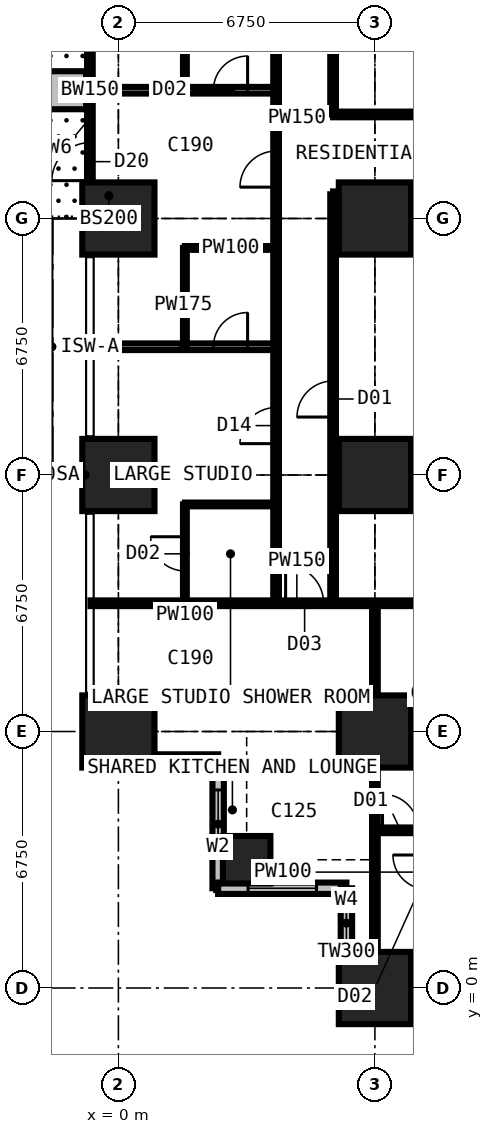
"""IFC4 building model, lengths in metres.
Left out: names, types, materials, properties, quantities, classifications, styles, units other than length and angle.
Written with IfcOpenShell. Run it as: python <this file> out.ifc"""

import sys

from ifc_helpers import new_model, si_unit, direction, frame, frame_2d, origin, origin_2d, place, context, subcontext, project, spatial, rectangle, extrude, element, fill, save


model = new_model("IFC4")
c1 = context("Model", 3, precision=1e-05, world=origin(), true_north=direction((0.0, 1.0)))
c2 = subcontext(c1, "Body", "Model", "MODEL_VIEW")
j1 = project(units=[si_unit("LENGTHUNIT", "METRE"), si_unit("PLANEANGLEUNIT", "RADIAN")], contexts=[c1])
p1 = place(None, origin())
s1 = spatial("IfcSite", under=j1, at=p1, CompositionType="ELEMENT")
p2 = place(p1, origin())
s2 = spatial("IfcBuilding", under=s1, at=p2, CompositionType="ELEMENT")
p3 = place(p2, frame((0.0, 0.0, 28.8)))
s3 = spatial("IfcBuildingStorey", under=s2, at=p3, CompositionType="ELEMENT", Elevation=28.8)
for number, where, z_axis, x_axis in (
    (1, (0.0, 6.75, 0.0), (0.0, 0.0, 1.0), (1.0, 0.0, 0.0)),
    (2, (0.0, 13.5, 0.0), (0.0, 0.0, 1.0), (1.0, 0.0, 0.0)),
    (3, (0.0, 20.25, 0.0), (0.0, 0.0, 1.0), (1.0, 0.0, 0.0)),
):
    element("IfcColumn", number, at=place(p3, frame(where, z_axis=z_axis, x_axis=x_axis)), inside=s3, PredefinedType="COLUMN", context=c2, shape_type="SweptSolid", body=[
        extrude(rectangle(XDim=1.9, YDim=1.9, at=origin_2d()), origin(), (0.0, 0.0, 1.0), 3.6),
    ])
p4 = place(p3, frame((3.375, 3.375, 0.0), z_axis=(0.0, 0.0, 1.0), x_axis=(1.0, 0.0, 0.0)))
e4 = element("IfcColumn", 4, at=p4, inside=s3, PredefinedType="COLUMN", context=c2, shape_type="SweptSolid", body=[
    extrude(rectangle(XDim=1.25, YDim=1.25, at=origin_2d()), origin(), (0.0, 0.0, 1.0), 3.6),
])
for number, where, z_axis, x_axis in (
    (5, (6.75, 0.0, 0.0), (0.0, 0.0, 1.0), (1.0, 0.0, 0.0)),
    (6, (6.75, 6.75, 0.0), (0.0, 0.0, 1.0), (1.0, 0.0, 0.0)),
    (7, (6.75, 13.5, 0.0), (0.0, 0.0, 1.0), (1.0, 0.0, 0.0)),
    (8, (6.75, 20.25, 0.0), (0.0, 0.0, 1.0), (1.0, 0.0, 0.0)),
):
    element("IfcColumn", number, at=place(p3, frame(where, z_axis=z_axis, x_axis=x_axis)), inside=s3, PredefinedType="COLUMN", context=c2, shape_type="SweptSolid", body=[
        extrude(rectangle(XDim=1.9, YDim=1.9, at=origin_2d()), origin(), (0.0, 0.0, 1.0), 3.6),
    ])
p5 = place(p3, frame((-0.75, 20.25, 0.0), z_axis=(0.0, 0.0, 1.0), x_axis=(0.0, 1.0, 0.0)))
e9 = element("IfcWall", 9, at=p5, inside=s3, PredefinedType="SOLIDWALL", context=c2, shape_type="SweptSolid", body=[
    extrude(rectangle(XDim=6.75, YDim=0.15, at=frame_2d((3.375, 0.0))), origin(), (0.0, 0.0, 1.0), 3.375),
])
p6 = place(p5, frame((0.996, 0.0, 0.0)))
e10 = element("IfcOpeningElement", 10, at=p6, cuts=e9, PredefinedType="OPENING", context=c2, shape_type="SweptSolid", body=[
    extrude(rectangle(XDim=1.0, YDim=2.2, at=frame_2d((0.5, 1.1))), frame((0.0, 0.085, 0.0), z_axis=(0.0, -1.0, 0.0), x_axis=(1.0, 0.0, 0.0)), (0.0, 0.0, 1.0), 0.17),
])
p7 = place(p5, frame((2.042, 0.0, 0.9)))
e11 = element("IfcOpeningElement", 11, at=p7, cuts=e9, PredefinedType="OPENING", context=c2, shape_type="SweptSolid", body=[
    extrude(rectangle(XDim=1.2, YDim=1.8, at=frame_2d((0.6, 0.9))), frame((0.0, 0.085, 0.0), z_axis=(0.0, -1.0, 0.0), x_axis=(1.0, 0.0, 0.0)), (0.0, 0.0, 1.0), 0.17),
])
p8 = place(p5, frame((4.754, 0.0, 0.0)))
e12 = element("IfcOpeningElement", 12, at=p8, cuts=e9, PredefinedType="OPENING", context=c2, shape_type="SweptSolid", body=[
    extrude(rectangle(XDim=1.0, YDim=2.2, at=frame_2d((0.5, 1.1))), frame((0.0, 0.085, 0.0), z_axis=(0.0, -1.0, 0.0), x_axis=(1.0, 0.0, 0.0)), (0.0, 0.0, 1.0), 0.17),
])
p9 = place(p5, frame((3.508, 0.0, 0.9)))
e13 = element("IfcOpeningElement", 13, at=p9, cuts=e9, PredefinedType="OPENING", context=c2, shape_type="SweptSolid", body=[
    extrude(rectangle(XDim=1.2, YDim=1.8, at=frame_2d((0.6, 0.9))), frame((0.0, 0.085, 0.0), z_axis=(0.0, -1.0, 0.0), x_axis=(1.0, 0.0, 0.0)), (0.0, 0.0, 1.0), 0.17),
])
p10 = place(p3, frame((-0.75, 6.0, 0.0), z_axis=(0.0, 0.0, 1.0), x_axis=(1.0, 0.0, 0.0)))
e14 = element("IfcWall", 14, at=p10, inside=s3, PredefinedType="SOLIDWALL", context=c2, shape_type="SweptSolid", body=[
    extrude(rectangle(XDim=3.375, YDim=0.3, at=frame_2d((1.688, 0.0))), origin(), (0.0, 0.0, 1.0), 3.375),
])
p11 = place(p10, frame((1.857, 0.0, 0.9)))
e15 = element("IfcOpeningElement", 15, at=p11, cuts=e14, PredefinedType="OPENING", context=c2, shape_type="SweptSolid", body=[
    extrude(rectangle(XDim=1.2, YDim=1.8, at=frame_2d((0.6, 0.9))), frame((0.0, 0.16, 0.0), z_axis=(0.0, -1.0, 0.0), x_axis=(1.0, 0.0, 0.0)), (0.0, 0.0, 1.0), 0.32),
])
p12 = place(p3, frame((2.625, 6.0, 0.0), z_axis=(0.0, 0.0, 1.0), x_axis=(0.0, -1.0, 0.0)))
e16 = element("IfcWall", 16, at=p12, inside=s3, PredefinedType="SOLIDWALL", context=c2, shape_type="SweptSolid", body=[
    extrude(rectangle(XDim=3.375, YDim=0.3, at=frame_2d((1.688, 0.0))), origin(), (0.0, 0.0, 1.0), 3.375),
])
p13 = place(p12, frame((0.788, 0.0, 0.6)))
e17 = element("IfcOpeningElement", 17, at=p13, cuts=e16, PredefinedType="OPENING", context=c2, shape_type="SweptSolid", body=[
    extrude(rectangle(XDim=1.8, YDim=2.1, at=frame_2d((0.9, 1.05))), frame((0.0, 0.16, 0.0), z_axis=(0.0, -1.0, 0.0), x_axis=(1.0, 0.0, 0.0)), (0.0, 0.0, 1.0), 0.32),
])
p14 = place(p3, frame((2.625, 2.625, 0.0), z_axis=(0.0, 0.0, 1.0), x_axis=(1.0, 0.0, 0.0)))
e18 = element("IfcWall", 18, at=p14, inside=s3, PredefinedType="SOLIDWALL", context=c2, shape_type="SweptSolid", body=[
    extrude(rectangle(XDim=3.375, YDim=0.3, at=frame_2d((1.688, 0.0))), origin(), (0.0, 0.0, 1.0), 3.375),
])
p15 = place(p14, frame((0.788, 0.0, 0.6)))
e19 = element("IfcOpeningElement", 19, at=p15, cuts=e18, PredefinedType="OPENING", context=c2, shape_type="SweptSolid", body=[
    extrude(rectangle(XDim=1.8, YDim=2.1, at=frame_2d((0.9, 1.05))), frame((0.0, 0.16, 0.0), z_axis=(0.0, -1.0, 0.0), x_axis=(1.0, 0.0, 0.0)), (0.0, 0.0, 1.0), 0.32),
])
p16 = place(p3, frame((6.0, 2.625, 0.0), z_axis=(0.0, 0.0, 1.0), x_axis=(0.0, -1.0, 0.0)))
e20 = element("IfcWall", 20, at=p16, inside=s3, PredefinedType="SOLIDWALL", context=c2, shape_type="SweptSolid", body=[
    extrude(rectangle(XDim=3.375, YDim=0.3, at=frame_2d((1.688, 0.0))), origin(), (0.0, 0.0, 1.0), 3.375),
])
p17 = place(p16, frame((0.317, 0.0, 0.9)))
e21 = element("IfcOpeningElement", 21, at=p17, cuts=e20, PredefinedType="OPENING", context=c2, shape_type="SweptSolid", body=[
    extrude(rectangle(XDim=1.2, YDim=1.8, at=frame_2d((0.6, 0.9))), frame((0.0, 0.16, 0.0), z_axis=(0.0, -1.0, 0.0), x_axis=(1.0, 0.0, 0.0)), (0.0, 0.0, 1.0), 0.32),
])
p18 = place(p3, frame((-0.85, 23.625, 0.0), z_axis=(0.0, 0.0, 1.0), x_axis=(-1.0, 0.0, 0.0)))
e22 = element("IfcWall", 22, at=p18, inside=s3, PredefinedType="USERDEFINED", context=c2, shape_type="SweptSolid", body=[
    extrude(rectangle(XDim=2.2, YDim=1.0, at=frame_2d((1.1, 0.0))), origin(), (0.0, 0.0, 1.0), 0.9),
])
p19 = place(p3, frame((-0.734, 10.125, 0.0), z_axis=(0.0, 0.0, 1.0), x_axis=(1.0, 0.0, 0.0)))
e23 = element("IfcWall", 23, at=p19, inside=s3, PredefinedType="PARTITIONING", context=c2, shape_type="SweptSolid", body=[
    extrude(rectangle(XDim=10.859, YDim=0.15, at=frame_2d((5.429, 0.0))), origin(), (0.0, 0.0, 1.0), 3.375),
])
p20 = place(p19, frame((5.134, 0.0, 0.0)))
e24 = element("IfcOpeningElement", 24, at=p20, cuts=e23, PredefinedType="OPENING", context=c2, shape_type="SweptSolid", body=[
    extrude(rectangle(XDim=1.0, YDim=2.2, at=frame_2d((0.5, 1.1))), frame((0.0, 0.085, 0.0), z_axis=(0.0, -1.0, 0.0), x_axis=(1.0, 0.0, 0.0)), (0.0, 0.0, 1.0), 0.17),
])
p21 = place(p3, frame((-0.734, 16.875, 0.0), z_axis=(0.0, 0.0, 1.0), x_axis=(1.0, 0.0, 0.0)))
e25 = element("IfcWall", 25, at=p21, inside=s3, PredefinedType="PARTITIONING", context=c2, shape_type="SweptSolid", body=[
    extrude(rectangle(XDim=4.884, YDim=0.175, at=frame_2d((2.442, 0.0))), origin(), (0.0, 0.0, 1.0), 3.375),
])
p22 = place(p21, frame((3.234, 0.0, 0.0)))
e26 = element("IfcOpeningElement", 26, at=p22, cuts=e25, PredefinedType="OPENING", context=c2, shape_type="SweptSolid", body=[
    extrude(rectangle(XDim=0.9, YDim=2.2, at=frame_2d((0.45, 1.1))), frame((0.0, 0.097, 0.0), z_axis=(0.0, -1.0, 0.0), x_axis=(1.0, 0.0, 0.0)), (0.0, 0.0, 1.0), 0.195),
])
p23 = place(p3, frame((-0.734, 23.625, 0.0), z_axis=(0.0, 0.0, 1.0), x_axis=(1.0, 0.0, 0.0)))
e27 = element("IfcWall", 27, at=p23, inside=s3, PredefinedType="PARTITIONING", context=c2, shape_type="SweptSolid", body=[
    extrude(rectangle(XDim=4.884, YDim=0.175, at=frame_2d((2.442, 0.0))), origin(), (0.0, 0.0, 1.0), 3.375),
])
p24 = place(p23, frame((3.234, 0.0, 0.0)))
e28 = element("IfcOpeningElement", 28, at=p24, cuts=e27, PredefinedType="OPENING", context=c2, shape_type="SweptSolid", body=[
    extrude(rectangle(XDim=0.9, YDim=2.2, at=frame_2d((0.45, 1.1))), frame((0.0, 0.097, 0.0), z_axis=(0.0, -1.0, 0.0), x_axis=(1.0, 0.0, 0.0)), (0.0, 0.0, 1.0), 0.195),
])
p25 = place(p3, frame((1.75, 10.125, 0.0), z_axis=(0.0, 0.0, 1.0), x_axis=(0.0, 1.0, 0.0)))
e29 = element("IfcWall", 29, at=p25, inside=s3, PredefinedType="PARTITIONING", context=c2, shape_type="SweptSolid", body=[
    extrude(rectangle(XDim=2.6, YDim=0.1, at=frame_2d((1.3, 0.0))), origin(), (0.0, 0.0, 1.0), 3.375),
])
p26 = place(p25, frame((0.85, 0.0, 0.0)))
e30 = element("IfcOpeningElement", 30, at=p26, cuts=e29, PredefinedType="OPENING", context=c2, shape_type="SweptSolid", body=[
    extrude(rectangle(XDim=0.9, YDim=2.2, at=frame_2d((0.45, 1.1))), frame((0.0, 0.06, 0.0), z_axis=(0.0, -1.0, 0.0), x_axis=(1.0, 0.0, 0.0)), (0.0, 0.0, 1.0), 0.12),
])
p27 = place(p3, frame((1.75, 12.725, 0.0), z_axis=(0.0, 0.0, 1.0), x_axis=(1.0, 0.0, 0.0)))
e31 = element("IfcWall", 31, at=p27, inside=s3, PredefinedType="PARTITIONING", context=c2, shape_type="SweptSolid", body=[
    extrude(rectangle(XDim=2.4, YDim=0.1, at=frame_2d((1.2, 0.0))), origin(), (0.0, 0.0, 1.0), 3.375),
])
p28 = place(p3, frame((1.75, 16.875, 0.0), z_axis=(0.0, 0.0, 1.0), x_axis=(0.0, 1.0, 0.0)))
e32 = element("IfcWall", 32, at=p28, inside=s3, PredefinedType="PARTITIONING", context=c2, shape_type="SweptSolid", body=[
    extrude(rectangle(XDim=2.6, YDim=0.1, at=frame_2d((1.3, 0.0))), origin(), (0.0, 0.0, 1.0), 3.375),
])
p29 = place(p3, frame((1.75, 19.475, 0.0), z_axis=(0.0, 0.0, 1.0), x_axis=(1.0, 0.0, 0.0)))
e33 = element("IfcWall", 33, at=p29, inside=s3, PredefinedType="PARTITIONING", context=c2, shape_type="SweptSolid", body=[
    extrude(rectangle(XDim=2.4, YDim=0.1, at=frame_2d((1.2, 0.0))), origin(), (0.0, 0.0, 1.0), 3.375),
])
p30 = place(p3, frame((1.75, 23.625, 0.0), z_axis=(0.0, 0.0, 1.0), x_axis=(0.0, 1.0, 0.0)))
e34 = element("IfcWall", 34, at=p30, inside=s3, PredefinedType="PARTITIONING", context=c2, shape_type="SweptSolid", body=[
    extrude(rectangle(XDim=2.6, YDim=0.1, at=frame_2d((1.3, 0.0))), origin(), (0.0, 0.0, 1.0), 3.375),
])
p31 = place(p3, frame((4.15, 10.125, 0.0), z_axis=(0.0, 0.0, 1.0), x_axis=(0.0, 1.0, 0.0)))
e35 = element("IfcWall", 35, at=p31, inside=s3, PredefinedType="PARTITIONING", context=c2, shape_type="SweptSolid", body=[
    extrude(rectangle(XDim=23.625, YDim=0.15, at=frame_2d((11.812, 0.0))), origin(), (0.0, 0.0, 1.0), 3.375),
])
p32 = place(p31, frame((4.2, 0.0, 0.0)))
e36 = element("IfcOpeningElement", 36, at=p32, cuts=e35, PredefinedType="OPENING", context=c2, shape_type="SweptSolid", body=[
    extrude(rectangle(XDim=0.95, YDim=2.2, at=frame_2d((0.475, 1.1))), frame((0.0, 0.085, 0.0), z_axis=(0.0, -1.0, 0.0), x_axis=(1.0, 0.0, 0.0)), (0.0, 0.0, 1.0), 0.17),
])
p33 = place(p31, frame((10.95, 0.0, 0.0)))
e37 = element("IfcOpeningElement", 37, at=p33, cuts=e35, PredefinedType="OPENING", context=c2, shape_type="SweptSolid", body=[
    extrude(rectangle(XDim=0.95, YDim=2.2, at=frame_2d((0.475, 1.1))), frame((0.0, 0.085, 0.0), z_axis=(0.0, -1.0, 0.0), x_axis=(1.0, 0.0, 0.0)), (0.0, 0.0, 1.0), 0.17),
])
p34 = place(p31, frame((17.7, 0.0, 0.0)))
e38 = element("IfcOpeningElement", 38, at=p34, cuts=e35, PredefinedType="OPENING", context=c2, shape_type="SweptSolid", body=[
    extrude(rectangle(XDim=0.95, YDim=2.2, at=frame_2d((0.475, 1.1))), frame((0.0, 0.085, 0.0), z_axis=(0.0, -1.0, 0.0), x_axis=(1.0, 0.0, 0.0)), (0.0, 0.0, 1.0), 0.17),
])
p35 = place(p3, frame((5.65, 10.125, 0.0), z_axis=(0.0, 0.0, 1.0), x_axis=(0.0, 1.0, 0.0)))
e39 = element("IfcWall", 39, at=p35, inside=s3, PredefinedType="PARTITIONING", context=c2, shape_type="SweptSolid", body=[
    extrude(rectangle(XDim=10.762, YDim=0.15, at=frame_2d((5.381, 0.0))), origin(), (0.0, 0.0, 1.0), 3.375),
])
p36 = place(p35, frame((4.9, 0.0, 0.0)))
e40 = element("IfcOpeningElement", 40, at=p36, cuts=e39, PredefinedType="OPENING", context=c2, shape_type="SweptSolid", body=[
    extrude(rectangle(XDim=0.95, YDim=2.2, at=frame_2d((0.475, 1.1))), frame((0.0, 0.085, 0.0), z_axis=(0.0, -1.0, 0.0), x_axis=(1.0, 0.0, 0.0)), (0.0, 0.0, 1.0), 0.17),
])
p37 = place(p3, frame((5.65, 20.887, 0.0), z_axis=(0.0, 0.0, 1.0), x_axis=(1.0, 0.0, 0.0)))
e41 = element("IfcWall", 41, at=p37, inside=s3, PredefinedType="PARTITIONING", context=c2, shape_type="SweptSolid", body=[
    extrude(rectangle(XDim=5.65, YDim=0.15, at=frame_2d((2.825, 0.0))), origin(), (0.0, 0.0, 1.0), 3.375),
])
p38 = place(p3, frame((5.65, 22.988, 0.0), z_axis=(0.0, 0.0, 1.0), x_axis=(0.0, 1.0, 0.0)))
e42 = element("IfcWall", 42, at=p38, inside=s3, PredefinedType="PARTITIONING", context=c2, shape_type="SweptSolid", body=[
    extrude(rectangle(XDim=10.762, YDim=0.15, at=frame_2d((5.381, 0.0))), origin(), (0.0, 0.0, 1.0), 3.375),
])
p39 = place(p38, frame((5.0, 0.0, 0.0)))
e43 = element("IfcOpeningElement", 43, at=p39, cuts=e42, PredefinedType="OPENING", context=c2, shape_type="SweptSolid", body=[
    extrude(rectangle(XDim=0.95, YDim=2.2, at=frame_2d((0.475, 1.1))), frame((0.0, 0.085, 0.0), z_axis=(0.0, -1.0, 0.0), x_axis=(1.0, 0.0, 0.0)), (0.0, 0.0, 1.0), 0.17),
])
p40 = place(p3, frame((5.65, 22.988, 0.0), z_axis=(0.0, 0.0, 1.0), x_axis=(1.0, 0.0, 0.0)))
e44 = element("IfcWall", 44, at=p40, inside=s3, PredefinedType="PARTITIONING", context=c2, shape_type="SweptSolid", body=[
    extrude(rectangle(XDim=5.65, YDim=0.15, at=frame_2d((2.825, 0.0))), origin(), (0.0, 0.0, 1.0), 3.375),
])
p41 = place(p3, frame((6.75, -0.734, 0.0), z_axis=(0.0, 0.0, 1.0), x_axis=(0.0, 1.0, 0.0)))
e45 = element("IfcWall", 45, at=p41, inside=s3, PredefinedType="PARTITIONING", context=c2, shape_type="SweptSolid", body=[
    extrude(rectangle(XDim=10.859, YDim=0.15, at=frame_2d((5.429, 0.0))), origin(), (0.0, 0.0, 1.0), 2.877),
])
p42 = place(p3, frame((6.75, 4.15, 0.0), z_axis=(0.0, 0.0, 1.0), x_axis=(1.0, 0.0, 0.0)))
e46 = element("IfcWall", 46, at=p42, inside=s3, PredefinedType="PARTITIONING", context=c2, shape_type="SweptSolid", body=[
    extrude(rectangle(XDim=23.625, YDim=0.15, at=frame_2d((11.812, 0.0))), origin(), (0.0, 0.0, 1.0), 3.375),
])
p43 = place(p42, frame((0.2, 0.0, 0.0)))
e47 = element("IfcOpeningElement", 47, at=p43, cuts=e46, PredefinedType="OPENING", context=c2, shape_type="SweptSolid", body=[
    extrude(rectangle(XDim=0.95, YDim=2.2, at=frame_2d((0.475, 1.1))), frame((0.0, 0.085, 0.0), z_axis=(0.0, -1.0, 0.0), x_axis=(1.0, 0.0, 0.0)), (0.0, 0.0, 1.0), 0.17),
])
p44 = place(p42, frame((3.625, 0.0, 0.0)))
e48 = element("IfcOpeningElement", 48, at=p44, cuts=e46, PredefinedType="OPENING", context=c2, shape_type="SweptSolid", body=[
    extrude(rectangle(XDim=0.95, YDim=2.2, at=frame_2d((0.475, 1.1))), frame((0.0, 0.085, 0.0), z_axis=(0.0, -1.0, 0.0), x_axis=(1.0, 0.0, 0.0)), (0.0, 0.0, 1.0), 0.17),
])
p45 = place(p42, frame((18.475, 0.0, 0.0)))
e49 = element("IfcOpeningElement", 49, at=p45, cuts=e46, PredefinedType="OPENING", context=c2, shape_type="SweptSolid", body=[
    extrude(rectangle(XDim=0.95, YDim=2.2, at=frame_2d((0.475, 1.1))), frame((0.0, 0.085, 0.0), z_axis=(0.0, -1.0, 0.0), x_axis=(1.0, 0.0, 0.0)), (0.0, 0.0, 1.0), 0.17),
])
p46 = place(p42, frame((11.725, 0.0, 0.0)))
e50 = element("IfcOpeningElement", 50, at=p46, cuts=e46, PredefinedType="OPENING", context=c2, shape_type="SweptSolid", body=[
    extrude(rectangle(XDim=0.95, YDim=2.2, at=frame_2d((0.475, 1.1))), frame((0.0, 0.085, 0.0), z_axis=(0.0, -1.0, 0.0), x_axis=(1.0, 0.0, 0.0)), (0.0, 0.0, 1.0), 0.17),
])
p47 = place(p42, frame((6.95, 0.0, 0.0)))
e51 = element("IfcOpeningElement", 51, at=p47, cuts=e46, PredefinedType="OPENING", context=c2, shape_type="SweptSolid", body=[
    extrude(rectangle(XDim=0.95, YDim=2.2, at=frame_2d((0.475, 1.1))), frame((0.0, 0.085, 0.0), z_axis=(0.0, -1.0, 0.0), x_axis=(1.0, 0.0, 0.0)), (0.0, 0.0, 1.0), 0.17),
])
p48 = place(p6, origin())
e52 = element("IfcDoor", 52, at=p48, inside=s3, OperationType="SINGLE_SWING_LEFT", PredefinedType="DOOR", context=c2, shape_type="SweptSolid", body=[
    extrude(rectangle(XDim=1.0, YDim=2.2, at=frame_2d((0.5, 1.1))), frame((0.0, 0.025, 0.0), z_axis=(0.0, -1.0, 0.0), x_axis=(1.0, 0.0, 0.0)), (0.0, 0.0, 1.0), 0.05),
])
fill(e10, e52)
p49 = place(p7, origin())
e53 = element("IfcWindow", 53, at=p49, inside=s3, PartitioningType="SINGLE_PANEL", PredefinedType="WINDOW", context=c2, shape_type="SweptSolid", body=[
    extrude(rectangle(XDim=1.2, YDim=1.8, at=frame_2d((0.6, 0.9))), frame((0.0, 0.03, 0.0), z_axis=(0.0, -1.0, 0.0), x_axis=(1.0, 0.0, 0.0)), (0.0, 0.0, 1.0), 0.06),
])
fill(e11, e53)
p50 = place(p9, origin())
e54 = element("IfcWindow", 54, at=p50, inside=s3, PartitioningType="SINGLE_PANEL", PredefinedType="WINDOW", context=c2, shape_type="SweptSolid", body=[
    extrude(rectangle(XDim=1.2, YDim=1.8, at=frame_2d((0.6, 0.9))), frame((0.0, 0.03, 0.0), z_axis=(0.0, -1.0, 0.0), x_axis=(1.0, 0.0, 0.0)), (0.0, 0.0, 1.0), 0.06),
])
fill(e13, e54)
p51 = place(p11, origin())
e55 = element("IfcWindow", 55, at=p51, inside=s3, PartitioningType="SINGLE_PANEL", PredefinedType="WINDOW", context=c2, shape_type="SweptSolid", body=[
    extrude(rectangle(XDim=1.2, YDim=1.8, at=frame_2d((0.6, 0.9))), frame((0.0, 0.03, 0.0), z_axis=(0.0, -1.0, 0.0), x_axis=(1.0, 0.0, 0.0)), (0.0, 0.0, 1.0), 0.06),
])
fill(e15, e55)
p52 = place(p13, origin())
e56 = element("IfcWindow", 56, at=p52, inside=s3, PartitioningType="SINGLE_PANEL", PredefinedType="WINDOW", context=c2, shape_type="SweptSolid", body=[
    extrude(rectangle(XDim=1.8, YDim=2.1, at=frame_2d((0.9, 1.05))), frame((0.0, 0.03, 0.0), z_axis=(0.0, -1.0, 0.0), x_axis=(1.0, 0.0, 0.0)), (0.0, 0.0, 1.0), 0.06),
])
fill(e17, e56)
p53 = place(p15, origin())
e57 = element("IfcWindow", 57, at=p53, inside=s3, PartitioningType="SINGLE_PANEL", PredefinedType="WINDOW", context=c2, shape_type="SweptSolid", body=[
    extrude(rectangle(XDim=1.8, YDim=2.1, at=frame_2d((0.9, 1.05))), frame((0.0, 0.03, 0.0), z_axis=(0.0, -1.0, 0.0), x_axis=(1.0, 0.0, 0.0)), (0.0, 0.0, 1.0), 0.06),
])
fill(e19, e57)
p54 = place(p17, origin())
e58 = element("IfcWindow", 58, at=p54, inside=s3, PartitioningType="SINGLE_PANEL", PredefinedType="WINDOW", context=c2, shape_type="SweptSolid", body=[
    extrude(rectangle(XDim=1.2, YDim=1.8, at=frame_2d((0.6, 0.9))), frame((0.0, 0.03, 0.0), z_axis=(0.0, -1.0, 0.0), x_axis=(1.0, 0.0, 0.0)), (0.0, 0.0, 1.0), 0.06),
])
fill(e21, e58)
p55 = place(p20, origin())
e59 = element("IfcDoor", 59, at=p55, inside=s3, OperationType="SINGLE_SWING_LEFT", PredefinedType="DOOR", context=c2, shape_type="SweptSolid", body=[
    extrude(rectangle(XDim=1.0, YDim=2.2, at=frame_2d((0.5, 1.1))), frame((0.0, 0.025, 0.0), z_axis=(0.0, -1.0, 0.0), x_axis=(1.0, 0.0, 0.0)), (0.0, 0.0, 1.0), 0.05),
])
fill(e24, e59)
p56 = place(p43, origin())
e60 = element("IfcDoor", 60, at=p56, inside=s3, OperationType="SINGLE_SWING_LEFT", PredefinedType="DOOR", context=c2, shape_type="SweptSolid", body=[
    extrude(rectangle(XDim=0.95, YDim=2.2, at=frame_2d((0.475, 1.1))), frame((0.0, 0.025, 0.0), z_axis=(0.0, -1.0, 0.0), x_axis=(1.0, 0.0, 0.0)), (0.0, 0.0, 1.0), 0.05),
])
fill(e47, e60)
p57 = place(p32, origin())
e61 = element("IfcDoor", 61, at=p57, inside=s3, OperationType="SINGLE_SWING_LEFT", PredefinedType="DOOR", context=c2, shape_type="SweptSolid", body=[
    extrude(rectangle(XDim=0.95, YDim=2.2, at=frame_2d((0.475, 1.1))), frame((0.0, 0.025, 0.0), z_axis=(0.0, -1.0, 0.0), x_axis=(1.0, 0.0, 0.0)), (0.0, 0.0, 1.0), 0.05),
])
fill(e36, e61)
p58 = place(p26, origin())
e62 = element("IfcDoor", 62, at=p58, inside=s3, OperationType="SINGLE_SWING_RIGHT", PredefinedType="DOOR", context=c2, shape_type="SweptSolid", body=[
    extrude(rectangle(XDim=0.9, YDim=2.2, at=frame_2d((0.45, 1.1))), frame((0.0, 0.025, 0.0), z_axis=(0.0, -1.0, 0.0), x_axis=(1.0, 0.0, 0.0)), (0.0, 0.0, 1.0), 0.05),
])
fill(e30, e62)
p59 = place(p33, origin())
e63 = element("IfcDoor", 63, at=p59, inside=s3, OperationType="SINGLE_SWING_LEFT", PredefinedType="DOOR", context=c2, shape_type="SweptSolid", body=[
    extrude(rectangle(XDim=0.95, YDim=2.2, at=frame_2d((0.475, 1.1))), frame((0.0, 0.025, 0.0), z_axis=(0.0, -1.0, 0.0), x_axis=(1.0, 0.0, 0.0)), (0.0, 0.0, 1.0), 0.05),
])
fill(e37, e63)
p60 = place(p22, origin())
e64 = element("IfcDoor", 64, at=p60, inside=s3, OperationType="SINGLE_SWING_RIGHT", PredefinedType="DOOR", context=c2, shape_type="SweptSolid", body=[
    extrude(rectangle(XDim=0.9, YDim=2.2, at=frame_2d((0.45, 1.1))), frame((0.0, 0.025, 0.0), z_axis=(0.0, -1.0, 0.0), x_axis=(1.0, 0.0, 0.0)), (0.0, 0.0, 1.0), 0.05),
])
fill(e26, e64)
p61 = place(p24, origin())
e65 = element("IfcDoor", 65, at=p61, inside=s3, OperationType="SINGLE_SWING_RIGHT", PredefinedType="DOOR", context=c2, shape_type="SweptSolid", body=[
    extrude(rectangle(XDim=0.9, YDim=2.2, at=frame_2d((0.45, 1.1))), frame((0.0, 0.025, 0.0), z_axis=(0.0, -1.0, 0.0), x_axis=(1.0, 0.0, 0.0)), (0.0, 0.0, 1.0), 0.05),
])
fill(e28, e65)
p62 = place(p36, origin())
e66 = element("IfcDoor", 66, at=p62, inside=s3, OperationType="SINGLE_SWING_LEFT", PredefinedType="DOOR", context=c2, shape_type="SweptSolid", body=[
    extrude(rectangle(XDim=0.95, YDim=2.2, at=frame_2d((0.475, 1.1))), frame((0.0, 0.025, 0.0), z_axis=(0.0, -1.0, 0.0), x_axis=(1.0, 0.0, 0.0)), (0.0, 0.0, 1.0), 0.05),
])
fill(e40, e66)
save(model, sys.argv[1])
